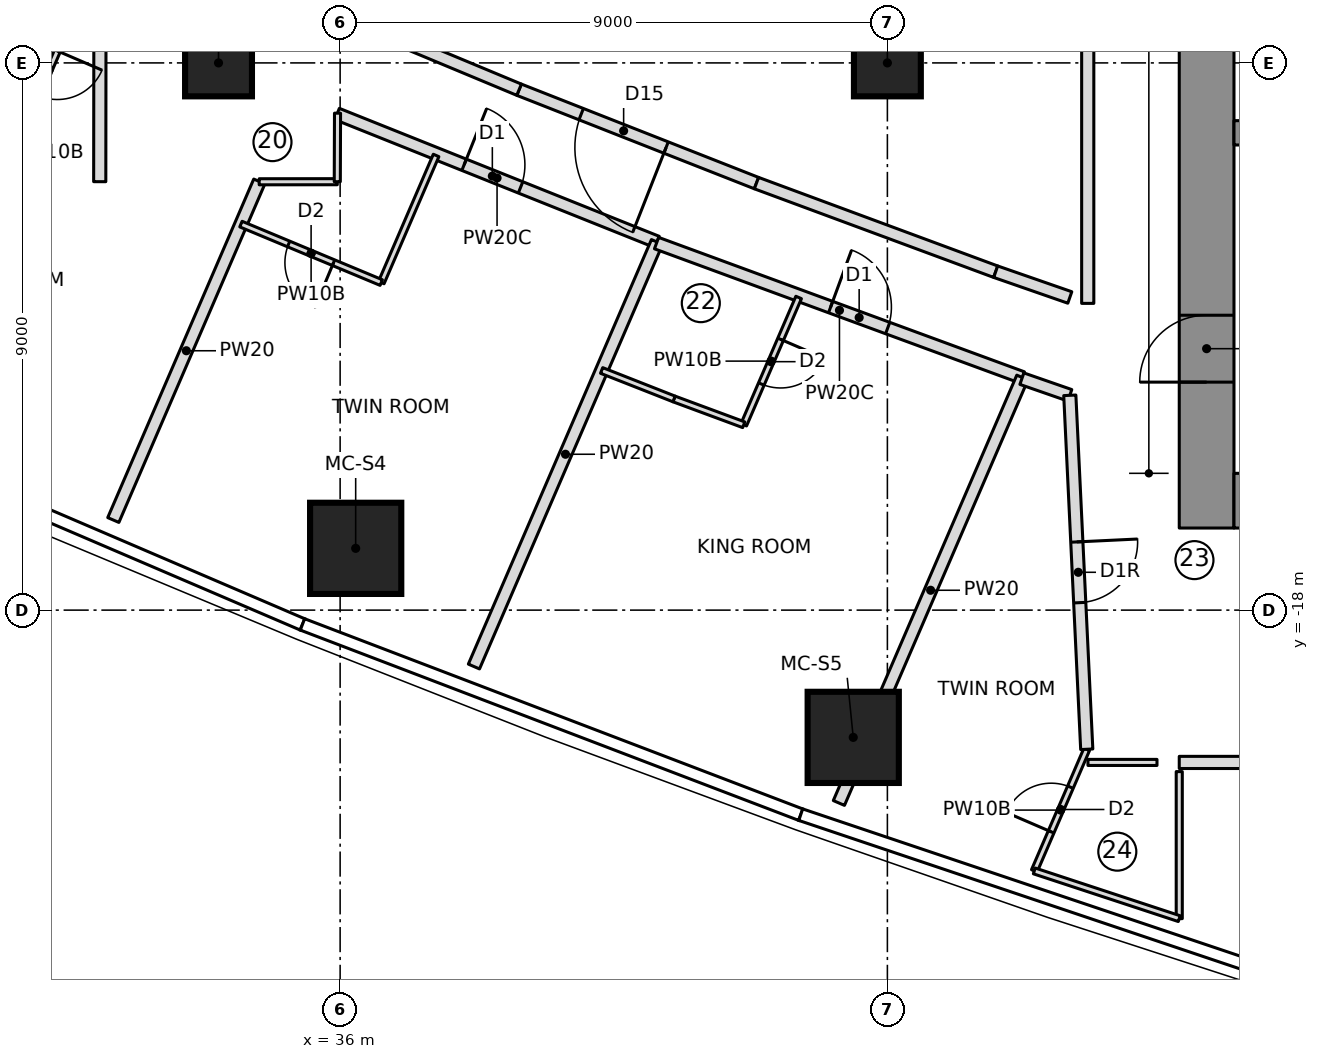
"""IFC4 building model, lengths in metres.
Left out: names, types, materials, properties, quantities, classifications, styles, units other than length and angle.
Written with IfcOpenShell. Run it as: python <this file> out.ifc"""

import sys

from ifc_helpers import new_model, si_unit, direction, frame, frame_2d, origin, origin_2d, place, context, subcontext, project, spatial, rectangle, extrude, element, fill, save


model = new_model("IFC4")
c1 = context("Model", 3, precision=1e-05, world=origin(), true_north=direction((0.0, 1.0)))
c2 = subcontext(c1, "Body", "Model", "MODEL_VIEW")
j1 = project(units=[si_unit("LENGTHUNIT", "METRE"), si_unit("PLANEANGLEUNIT", "RADIAN")], contexts=[c1])
p1 = place(None, origin())
s1 = spatial("IfcSite", under=j1, at=p1, CompositionType="ELEMENT")
p2 = place(p1, origin())
s2 = spatial("IfcBuilding", under=s1, at=p2, CompositionType="ELEMENT")
p3 = place(p2, frame((0.0, 0.0, 151.5)))
s3 = spatial("IfcBuildingStorey", under=s2, at=p3, CompositionType="ELEMENT", Elevation=151.5)
p4 = place(p3, frame((50.25, -16.65, 0.0), z_axis=(0.0, 0.0, 1.0), x_axis=(0.0, 1.0, 0.0)))
e1 = element("IfcWall", 1, at=p4, inside=s3, PredefinedType="SHEAR", context=c2, shape_type="SweptSolid", body=[
    extrude(rectangle(XDim=10.0, YDim=0.9, at=frame_2d((5.0, 0.0))), origin(), (0.0, 0.0, 1.0), 3.55),
])
p5 = place(p4, frame((2.4, 0.0, 0.0)))
e2 = element("IfcOpeningElement", 2, at=p5, cuts=e1, PredefinedType="OPENING", context=c2, shape_type="SweptSolid", body=[
    extrude(rectangle(XDim=1.1, YDim=2.1, at=frame_2d((0.55, 1.05))), frame((0.0, 0.46, 0.0), z_axis=(0.0, -1.0, 0.0), x_axis=(1.0, 0.0, 0.0)), (0.0, 0.0, 1.0), 0.92),
])
p6 = place(p3, frame((50.7, -16.2, 0.0), z_axis=(0.0, 0.0, 1.0), x_axis=(1.0, 0.0, 0.0)))
e3 = element("IfcWall", 3, at=p6, inside=s3, PredefinedType="SHEAR", context=c2, shape_type="SweptSolid", body=[
    extrude(rectangle(XDim=13.92, YDim=0.9, at=frame_2d((6.96, 0.0))), origin(), (0.0, 0.0, 1.0), 3.55),
])
p7 = place(p3, frame((50.7, -10.15, 0.0), z_axis=(0.0, 0.0, 1.0), x_axis=(1.0, 0.0, 0.0)))
e4 = element("IfcWall", 4, at=p7, inside=s3, PredefinedType="SHEAR", context=c2, shape_type="SweptSolid", body=[
    extrude(rectangle(XDim=13.02, YDim=0.4, at=frame_2d((6.51, 0.0))), origin(), (0.0, 0.0, 1.0), 3.55),
])
for number, where, z_axis, x_axis in (
    (5, (36.256, -16.984, 0.0), (0.0, 0.0, 1.0), (1.0, 0.0, 0.0)),
    (6, (44.438, -20.093, 0.0), (0.0, 0.0, 1.0), (1.0, 0.0, 0.0)),
):
    element("IfcColumn", number, at=place(p3, frame(where, z_axis=z_axis, x_axis=x_axis)), inside=s3, PredefinedType="COLUMN", context=c2, shape_type="SweptSolid", body=[
        extrude(rectangle(XDim=1.5, YDim=1.5, at=origin_2d()), origin(), (0.0, 0.0, 1.0), 3.55),
    ])
for number, where, z_axis, x_axis in (
    (7, (34.0, -9.0, 0.0), (0.0, 0.0, 1.0), (1.0, 0.0, 0.0)),
    (8, (45.0, -9.0, 0.0), (0.0, 0.0, 1.0), (1.0, 0.0, 0.0)),
):
    element("IfcColumn", number, at=place(p3, frame(where, z_axis=z_axis, x_axis=x_axis)), inside=s3, PredefinedType="COLUMN", context=c2, shape_type="SweptSolid", body=[
        extrude(rectangle(XDim=1.1, YDim=1.1, at=origin_2d()), origin(), (0.0, 0.0, 1.0), 3.55),
    ])
p8 = place(p3, frame((31.647, -8.114, 0.0), z_axis=(0.0, 0.0, 1.0), x_axis=(-0.395926443446, -0.91828222861, 0.0)))
e9 = element("IfcWall", 9, at=p8, inside=s3, PredefinedType="PARTITIONING", context=c2, shape_type="SweptSolid", body=[
    extrude(rectangle(XDim=2.157, YDim=0.1, at=frame_2d((1.079, 0.0))), origin(), (0.0, 0.0, 1.0), 3.25),
])
p9 = place(p8, frame((0.75, 0.0, 0.0)))
e10 = element("IfcOpeningElement", 10, at=p9, cuts=e9, PredefinedType="OPENING", context=c2, shape_type="SweptSolid", body=[
    extrude(rectangle(XDim=0.8, YDim=2.1, at=frame_2d((0.4, 1.05))), frame((0.0, 0.06, 0.0), z_axis=(0.0, -1.0, 0.0), x_axis=(1.0, 0.0, 0.0)), (0.0, 0.0, 1.0), 0.12),
])
p10 = place(p3, frame((32.27, -16.518, 0.0), z_axis=(0.0, 0.0, 1.0), x_axis=(0.395978622303, 0.918259729422, 0.0)))
e11 = element("IfcWall", 11, at=p10, inside=s3, PredefinedType="PARTITIONING", context=c2, shape_type="SweptSolid", body=[
    extrude(rectangle(XDim=6.064, YDim=0.2, at=frame_2d((3.032, 0.0))), origin(), (0.0, 0.0, 1.0), 3.25),
])
p11 = place(p3, frame((35.95, -9.84, 0.0), z_axis=(0.0, 0.0, 1.0), x_axis=(0.92844400648, -0.371472376943, 0.0)))
e12 = element("IfcWall", 12, at=p11, inside=s3, PredefinedType="PARTITIONING", context=c2, shape_type="SweptSolid", body=[
    extrude(rectangle(XDim=5.667, YDim=0.2, at=frame_2d((2.833, 0.0))), origin(), (0.0, 0.0, 1.0), 3.25),
])
p12 = place(p11, frame((2.25, 0.0, 0.0)))
e13 = element("IfcOpeningElement", 13, at=p12, cuts=e12, PredefinedType="OPENING", context=c2, shape_type="SweptSolid", body=[
    extrude(rectangle(XDim=1.0, YDim=2.1, at=frame_2d((0.5, 1.05))), frame((0.0, 0.11, 0.0), z_axis=(0.0, -1.0, 0.0), x_axis=(1.0, 0.0, 0.0)), (0.0, 0.0, 1.0), 0.22),
])
p13 = place(p3, frame((37.578, -10.522, 0.0), z_axis=(0.0, 0.0, 1.0), x_axis=(-0.395975890988, -0.918260907235, 0.0)))
e14 = element("IfcWall", 14, at=p13, inside=s3, PredefinedType="PARTITIONING", context=c2, shape_type="SweptSolid", body=[
    extrude(rectangle(XDim=2.277, YDim=0.1, at=frame_2d((1.138, 0.0))), origin(), (0.0, 0.0, 1.0), 3.25),
])
p14 = place(p3, frame((36.677, -12.613, 0.0), z_axis=(0.0, 0.0, 1.0), x_axis=(-0.923019129633, 0.384754059538, 0.0)))
e15 = element("IfcWall", 15, at=p14, inside=s3, PredefinedType="PARTITIONING", context=c2, shape_type="SweptSolid", body=[
    extrude(rectangle(XDim=2.5, YDim=0.1, at=frame_2d((1.25, 0.0))), origin(), (0.0, 0.0, 1.0), 3.25),
])
p15 = place(p14, frame((0.85, 0.0, 0.0)))
e16 = element("IfcOpeningElement", 16, at=p15, cuts=e15, PredefinedType="OPENING", context=c2, shape_type="SweptSolid", body=[
    extrude(rectangle(XDim=0.8, YDim=2.1, at=frame_2d((0.4, 1.05))), frame((0.0, 0.06, 0.0), z_axis=(0.0, -1.0, 0.0), x_axis=(1.0, 0.0, 0.0)), (0.0, 0.0, 1.0), 0.12),
])
p16 = place(p3, frame((38.2, -18.927, 0.0), z_axis=(0.0, 0.0, 1.0), x_axis=(0.396014676371, 0.918244181086, 0.0)))
e17 = element("IfcWall", 17, at=p16, inside=s3, PredefinedType="PARTITIONING", context=c2, shape_type="SweptSolid", body=[
    extrude(rectangle(XDim=7.604, YDim=0.2, at=frame_2d((3.802, 0.0))), origin(), (0.0, 0.0, 1.0), 3.25),
])
p17 = place(p3, frame((41.204, -11.964, 0.0), z_axis=(0.0, 0.0, 1.0), x_axis=(0.938614648514, -0.34496745005, 0.0)))
e18 = element("IfcWall", 18, at=p17, inside=s3, PredefinedType="PARTITIONING", context=c2, shape_type="SweptSolid", body=[
    extrude(rectangle(XDim=6.41, YDim=0.2, at=frame_2d((3.205, 0.0))), origin(), (0.0, 0.0, 1.0), 3.25),
])
p18 = place(p17, frame((3.05, 0.0, 0.0)))
e19 = element("IfcOpeningElement", 19, at=p18, cuts=e18, PredefinedType="OPENING", context=c2, shape_type="SweptSolid", body=[
    extrude(rectangle(XDim=1.0, YDim=2.1, at=frame_2d((0.5, 1.05))), frame((0.0, 0.11, 0.0), z_axis=(0.0, -1.0, 0.0), x_axis=(1.0, 0.0, 0.0)), (0.0, 0.0, 1.0), 0.22),
])
p19 = place(p3, frame((43.541, -12.858, 0.0), z_axis=(0.0, 0.0, 1.0), x_axis=(-0.396050400308, -0.918228773463, 0.0)))
e20 = element("IfcWall", 20, at=p19, inside=s3, PredefinedType="PARTITIONING", context=c2, shape_type="SweptSolid", body=[
    extrude(rectangle(XDim=2.28, YDim=0.1, at=frame_2d((1.14, 0.0))), origin(), (0.0, 0.0, 1.0), 3.25),
])
p20 = place(p19, frame((0.75, 0.0, 0.0)))
e21 = element("IfcOpeningElement", 21, at=p20, cuts=e20, PredefinedType="OPENING", context=c2, shape_type="SweptSolid", body=[
    extrude(rectangle(XDim=0.8, YDim=2.1, at=frame_2d((0.4, 1.05))), frame((0.0, 0.06, 0.0), z_axis=(0.0, -1.0, 0.0), x_axis=(1.0, 0.0, 0.0)), (0.0, 0.0, 1.0), 0.12),
])
p21 = place(p3, frame((42.638, -14.951, 0.0), z_axis=(0.0, 0.0, 1.0), x_axis=(-0.937806575222, 0.34715821677, 0.0)))
e22 = element("IfcWall", 22, at=p21, inside=s3, PredefinedType="PARTITIONING", context=c2, shape_type="SweptSolid", body=[
    extrude(rectangle(XDim=1.222, YDim=0.1, at=frame_2d((0.611, 0.0))), origin(), (0.0, 0.0, 1.0), 3.25),
])
p22 = place(p3, frame((41.491, -14.527, 0.0), z_axis=(0.0, 0.0, 1.0), x_axis=(-0.930605363194, 0.36602412215, 0.0)))
e23 = element("IfcWall", 23, at=p22, inside=s3, PredefinedType="PARTITIONING", context=c2, shape_type="SweptSolid", body=[
    extrude(rectangle(XDim=1.28, YDim=0.1, at=frame_2d((0.64, 0.0))), origin(), (0.0, 0.0, 1.0), 3.25),
])
p23 = place(p3, frame((44.202, -21.172, 0.0), z_axis=(0.0, 0.0, 1.0), x_axis=(0.39600636385, 0.918247766014, 0.0)))
e24 = element("IfcWall", 24, at=p23, inside=s3, PredefinedType="PARTITIONING", context=c2, shape_type="SweptSolid", body=[
    extrude(rectangle(XDim=7.62, YDim=0.2, at=frame_2d((3.81, 0.0))), origin(), (0.0, 0.0, 1.0), 3.25),
])
p24 = place(p3, frame((47.416, -22.289, 0.0), z_axis=(0.0, 0.0, 1.0), x_axis=(0.396028123143, 0.918238381729, 0.0)))
e25 = element("IfcWall", 25, at=p24, inside=s3, PredefinedType="PARTITIONING", context=c2, shape_type="SweptSolid", body=[
    extrude(rectangle(XDim=2.179, YDim=0.1, at=frame_2d((1.089, 0.0))), origin(), (0.0, 0.0, 1.0), 3.25),
])
p25 = place(p24, frame((0.7, 0.0, 0.0)))
e26 = element("IfcOpeningElement", 26, at=p25, cuts=e25, PredefinedType="OPENING", context=c2, shape_type="SweptSolid", body=[
    extrude(rectangle(XDim=0.8, YDim=2.1, at=frame_2d((0.4, 1.05))), frame((0.0, 0.06, 0.0), z_axis=(0.0, -1.0, 0.0), x_axis=(1.0, 0.0, 0.0)), (0.0, 0.0, 1.0), 0.12),
])
p26 = place(p3, frame((42.847, -10.977, 0.0), z_axis=(0.0, 0.0, 1.0), x_axis=(-0.930576677263, 0.36609704688, 0.0)))
e27 = element("IfcWall", 27, at=p26, inside=s3, PredefinedType="PARTITIONING", context=c2, shape_type="SweptSolid", body=[
    extrude(rectangle(XDim=4.195, YDim=0.2, at=frame_2d((2.098, 0.0))), origin(), (0.0, 0.0, 1.0), 3.25),
])
p27 = place(p26, frame((1.598, 0.0, 0.0)))
e28 = element("IfcOpeningElement", 28, at=p27, cuts=e27, PredefinedType="OPENING", context=c2, shape_type="SweptSolid", body=[
    extrude(rectangle(XDim=1.5, YDim=2.1, at=frame_2d((0.75, 1.05))), frame((0.0, 0.11, 0.0), z_axis=(0.0, -1.0, 0.0), x_axis=(1.0, 0.0, 0.0)), (0.0, 0.0, 1.0), 0.22),
])
p28 = place(p3, frame((46.781, -12.434, 0.0), z_axis=(0.0, 0.0, 1.0), x_axis=(-0.937732614305, 0.347357948044, 0.0)))
e29 = element("IfcWall", 29, at=p28, inside=s3, PredefinedType="PARTITIONING", context=c2, shape_type="SweptSolid", body=[
    extrude(rectangle(XDim=4.195, YDim=0.2, at=frame_2d((2.098, 0.0))), origin(), (0.0, 0.0, 1.0), 3.25),
])
p29 = place(p3, frame((38.943, -9.441, 0.0), z_axis=(0.0, 0.0, 1.0), x_axis=(-0.923008963065, 0.384778448073, 0.0)))
e30 = element("IfcWall", 30, at=p29, inside=s3, PredefinedType="PARTITIONING", context=c2, shape_type="SweptSolid", body=[
    extrude(rectangle(XDim=2.339, YDim=0.2, at=frame_2d((1.169, 0.0))), origin(), (0.0, 0.0, 1.0), 3.25),
])
p30 = place(p3, frame((49.8, -20.505, 0.0), z_axis=(0.0, 0.0, 1.0), x_axis=(1.0, 0.0, 0.0)))
e31 = element("IfcWall", 31, at=p30, inside=s3, PredefinedType="PARTITIONING", context=c2, shape_type="SweptSolid", body=[
    extrude(rectangle(XDim=12.133, YDim=0.2, at=frame_2d((6.066, 0.0))), origin(), (0.0, 0.0, 1.0), 3.25),
])
p31 = place(p30, frame((5.566, 0.0, 0.0)))
e32 = element("IfcOpeningElement", 32, at=p31, cuts=e31, PredefinedType="OPENING", context=c2, shape_type="SweptSolid", body=[
    extrude(rectangle(XDim=1.5, YDim=2.1, at=frame_2d((0.75, 1.05))), frame((0.0, 0.11, 0.0), z_axis=(0.0, -1.0, 0.0), x_axis=(1.0, 0.0, 0.0)), (0.0, 0.0, 1.0), 0.22),
])
p32 = place(p3, frame((34.669, -10.955, 0.0), z_axis=(0.0, 0.0, 1.0), x_axis=(0.99999954838, 0.000950389231, 0.0)))
e33 = element("IfcWall", 33, at=p32, inside=s3, PredefinedType="PARTITIONING", context=c2, shape_type="SweptSolid", body=[
    extrude(rectangle(XDim=1.284, YDim=0.1, at=frame_2d((0.642, 0.0))), origin(), (0.0, 0.0, 1.0), 3.25),
])
p33 = place(p3, frame((35.953, -10.954, 0.0), z_axis=(0.0, 0.0, 1.0), x_axis=(0.003465432949, 0.999993995369, 0.0)))
e34 = element("IfcWall", 34, at=p33, inside=s3, PredefinedType="PARTITIONING", context=c2, shape_type="SweptSolid", body=[
    extrude(rectangle(XDim=1.127, YDim=0.1, at=frame_2d((0.563, 0.0))), origin(), (0.0, 0.0, 1.0), 3.25),
])
p34 = place(p3, frame((48.299, -20.505, 0.0), z_axis=(0.0, 0.0, 1.0), x_axis=(1.0, 0.0, 0.0)))
e35 = element("IfcWall", 35, at=p34, inside=s3, PredefinedType="PARTITIONING", context=c2, shape_type="SweptSolid", body=[
    extrude(rectangle(XDim=1.135, YDim=0.1, at=frame_2d((0.568, 0.0))), origin(), (0.0, 0.0, 1.0), 3.25),
])
p35 = place(p3, frame((49.8, -20.656, 0.0), z_axis=(0.0, 0.0, 1.0), x_axis=(0.0, -1.0, 0.0)))
e36 = element("IfcWall", 36, at=p35, inside=s3, PredefinedType="PARTITIONING", context=c2, shape_type="SweptSolid", body=[
    extrude(rectangle(XDim=2.418, YDim=0.1, at=frame_2d((1.209, 0.0))), origin(), (0.0, 0.0, 1.0), 3.25),
])
p36 = place(p3, frame((49.8, -23.074, 0.0), z_axis=(0.0, 0.0, 1.0), x_axis=(-0.949844078437, 0.312723882455, 0.0)))
e37 = element("IfcWall", 37, at=p36, inside=s3, PredefinedType="PARTITIONING", context=c2, shape_type="SweptSolid", body=[
    extrude(rectangle(XDim=2.51, YDim=0.1, at=frame_2d((1.255, 0.0))), origin(), (0.0, 0.0, 1.0), 3.25),
])
p37 = place(p3, frame((47.212, -14.193, 0.0), z_axis=(0.0, 0.0, 1.0), x_axis=(0.944567831704, -0.32831632812, 0.0)))
e38 = element("IfcWall", 38, at=p37, inside=s3, PredefinedType="PARTITIONING", context=c2, shape_type="SweptSolid", body=[
    extrude(rectangle(XDim=0.834, YDim=0.2, at=frame_2d((0.417, 0.0))), origin(), (0.0, 0.0, 1.0), 3.25),
])
p38 = place(p3, frame((48.0, -12.858, 0.0), z_axis=(0.0, 0.0, 1.0), x_axis=(-0.944517215109, 0.328461916152, 0.0)))
e39 = element("IfcWall", 39, at=p38, inside=s3, PredefinedType="PARTITIONING", context=c2, shape_type="SweptSolid", body=[
    extrude(rectangle(XDim=1.29, YDim=0.2, at=frame_2d((0.645, 0.0))), origin(), (0.0, 0.0, 1.0), 3.25),
])
p39 = place(p3, frame((48.0, -14.467, 0.0), z_axis=(0.0, 0.0, 1.0), x_axis=(0.047837808481, -0.998855116661, 0.0)))
e40 = element("IfcWall", 40, at=p39, inside=s3, PredefinedType="PARTITIONING", context=c2, shape_type="SweptSolid", body=[
    extrude(rectangle(XDim=5.828, YDim=0.2, at=frame_2d((2.914, 0.0))), origin(), (0.0, 0.0, 1.0), 3.25),
])
p40 = place(p39, frame((2.414, 0.0, 0.0)))
e41 = element("IfcOpeningElement", 41, at=p40, cuts=e40, PredefinedType="OPENING", context=c2, shape_type="SweptSolid", body=[
    extrude(rectangle(XDim=1.0, YDim=2.1, at=frame_2d((0.5, 1.05))), frame((0.0, 0.11, 0.0), z_axis=(0.0, -1.0, 0.0), x_axis=(1.0, 0.0, 0.0)), (0.0, 0.0, 1.0), 0.22),
])
p41 = place(p3, frame((48.295, 12.955, 0.0), z_axis=(0.0, 0.0, 1.0), x_axis=(0.0, -1.0, 0.0)))
e42 = element("IfcWall", 42, at=p41, inside=s3, PredefinedType="PARTITIONING", context=c2, shape_type="SweptSolid", body=[
    extrude(rectangle(XDim=25.91, YDim=0.2, at=frame_2d((12.955, 0.0))), origin(), (0.0, 0.0, 1.0), 3.25),
])
p42 = place(p3, frame((32.05, -8.135, 0.0), z_axis=(0.0, 0.0, 1.0), x_axis=(-0.001299262654, -0.999999155958, 0.0)))
e43 = element("IfcWall", 43, at=p42, inside=s3, PredefinedType="PARTITIONING", context=c2, shape_type="SweptSolid", body=[
    extrude(rectangle(XDim=2.819, YDim=0.2, at=frame_2d((1.409, 0.0))), origin(), (0.0, 0.0, 1.0), 3.25),
])
p43 = place(p9, origin())
e44 = element("IfcDoor", 44, at=p43, inside=s3, OperationType="SINGLE_SWING_LEFT", PredefinedType="DOOR", context=c2, shape_type="SweptSolid", body=[
    extrude(rectangle(XDim=0.8, YDim=2.1, at=frame_2d((0.4, 1.05))), frame((0.0, 0.025, 0.0), z_axis=(0.0, -1.0, 0.0), x_axis=(1.0, 0.0, 0.0)), (0.0, 0.0, 1.0), 0.05),
])
fill(e10, e44)
p44 = place(p15, origin())
e45 = element("IfcDoor", 45, at=p44, inside=s3, OperationType="SINGLE_SWING_LEFT", PredefinedType="DOOR", context=c2, shape_type="SweptSolid", body=[
    extrude(rectangle(XDim=0.8, YDim=2.1, at=frame_2d((0.4, 1.05))), frame((0.0, 0.025, 0.0), z_axis=(0.0, -1.0, 0.0), x_axis=(1.0, 0.0, 0.0)), (0.0, 0.0, 1.0), 0.05),
])
fill(e16, e45)
p45 = place(p12, origin())
e46 = element("IfcDoor", 46, at=p45, inside=s3, OperationType="SINGLE_SWING_LEFT", PredefinedType="DOOR", context=c2, shape_type="SweptSolid", body=[
    extrude(rectangle(XDim=1.0, YDim=2.1, at=frame_2d((0.5, 1.05))), frame((0.0, 0.025, 0.0), z_axis=(0.0, -1.0, 0.0), x_axis=(1.0, 0.0, 0.0)), (0.0, 0.0, 1.0), 0.05),
])
fill(e13, e46)
p46 = place(p20, origin())
e47 = element("IfcDoor", 47, at=p46, inside=s3, OperationType="SINGLE_SWING_LEFT", PredefinedType="DOOR", context=c2, shape_type="SweptSolid", body=[
    extrude(rectangle(XDim=0.8, YDim=2.1, at=frame_2d((0.4, 1.05))), frame((0.0, 0.025, 0.0), z_axis=(0.0, -1.0, 0.0), x_axis=(1.0, 0.0, 0.0)), (0.0, 0.0, 1.0), 0.05),
])
fill(e21, e47)
p47 = place(p18, origin())
e48 = element("IfcDoor", 48, at=p47, inside=s3, OperationType="SINGLE_SWING_LEFT", PredefinedType="DOOR", context=c2, shape_type="SweptSolid", body=[
    extrude(rectangle(XDim=1.0, YDim=2.1, at=frame_2d((0.5, 1.05))), frame((0.0, 0.025, 0.0), z_axis=(0.0, -1.0, 0.0), x_axis=(1.0, 0.0, 0.0)), (0.0, 0.0, 1.0), 0.05),
])
fill(e19, e48)
p48 = place(p25, origin())
e49 = element("IfcDoor", 49, at=p48, inside=s3, OperationType="SINGLE_SWING_LEFT", PredefinedType="DOOR", context=c2, shape_type="SweptSolid", body=[
    extrude(rectangle(XDim=0.8, YDim=2.1, at=frame_2d((0.4, 1.05))), frame((0.0, 0.025, 0.0), z_axis=(0.0, -1.0, 0.0), x_axis=(1.0, 0.0, 0.0)), (0.0, 0.0, 1.0), 0.05),
])
fill(e26, e49)
p49 = place(p27, origin())
e50 = element("IfcDoor", 50, at=p49, inside=s3, OperationType="DOUBLE_DOOR_SINGLE_SWING", PredefinedType="DOOR", context=c2, shape_type="SweptSolid", body=[
    extrude(rectangle(XDim=1.5, YDim=2.1, at=frame_2d((0.75, 1.05))), frame((0.0, 0.025, 0.0), z_axis=(0.0, -1.0, 0.0), x_axis=(1.0, 0.0, 0.0)), (0.0, 0.0, 1.0), 0.05),
])
fill(e28, e50)
p50 = place(p40, origin())
e51 = element("IfcDoor", 51, at=p50, inside=s3, OperationType="SINGLE_SWING_RIGHT", PredefinedType="DOOR", context=c2, shape_type="SweptSolid", body=[
    extrude(rectangle(XDim=1.0, YDim=2.1, at=frame_2d((0.5, 1.05))), frame((0.0, 0.025, 0.0), z_axis=(0.0, -1.0, 0.0), x_axis=(1.0, 0.0, 0.0)), (0.0, 0.0, 1.0), 0.05),
])
fill(e41, e51)
p51 = place(p5, origin())
e52 = element("IfcDoor", 52, at=p51, inside=s3, OperationType="SINGLE_SWING_RIGHT", PredefinedType="DOOR", context=c2, shape_type="SweptSolid", body=[
    extrude(rectangle(XDim=1.1, YDim=2.1, at=frame_2d((0.55, 1.05))), frame((0.0, 0.025, 0.0), z_axis=(0.0, -1.0, 0.0), x_axis=(1.0, 0.0, 0.0)), (0.0, 0.0, 1.0), 0.05),
])
fill(e2, e52)
save(model, sys.argv[1])
